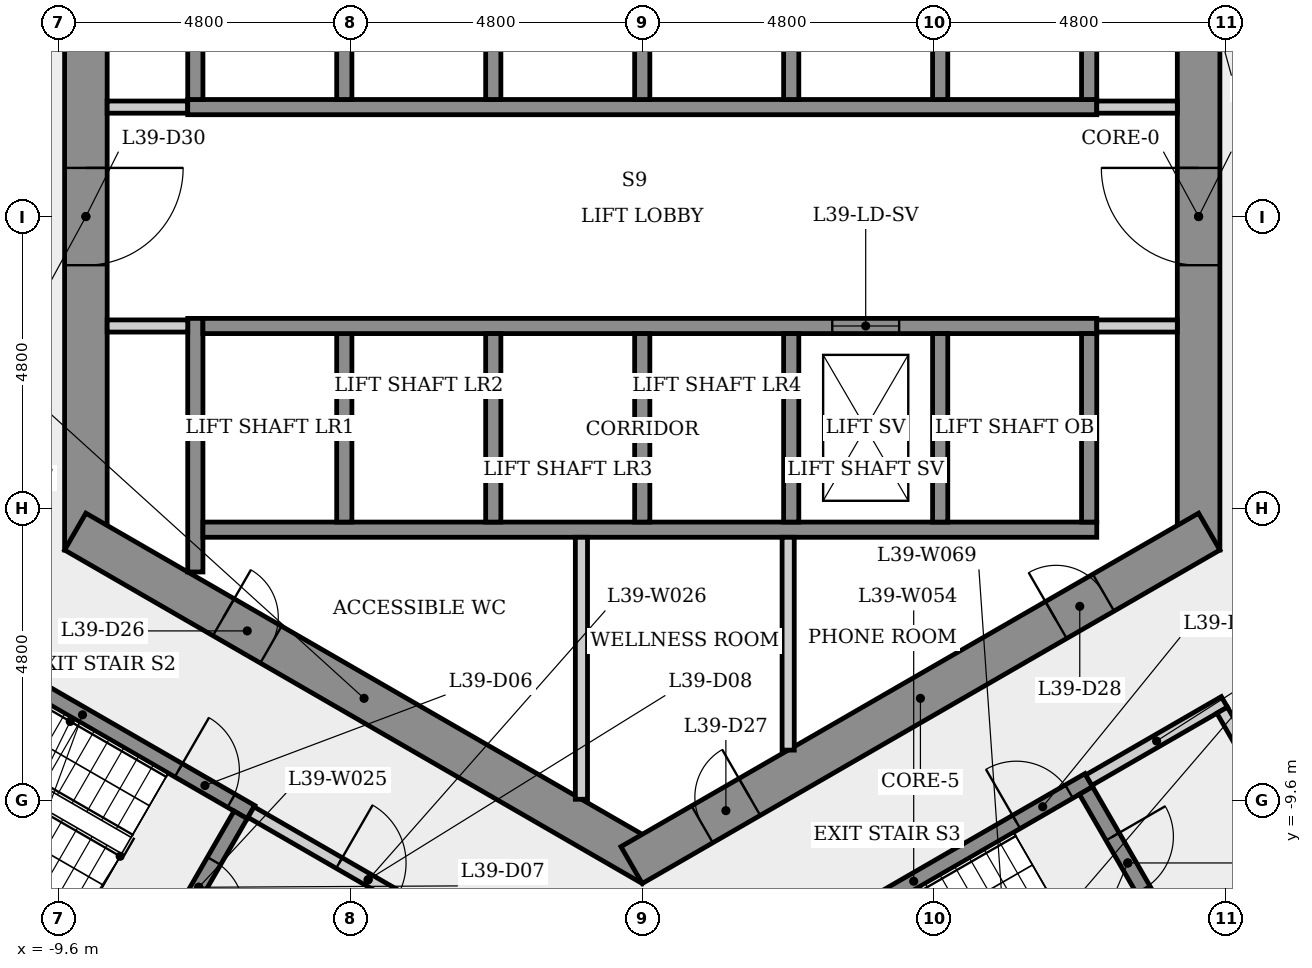
"""IFC4 building model, lengths in metres.
Left out: names, types, materials, properties, quantities, classifications, styles, units other than length and angle.
Written with IfcOpenShell. Run it as: python <this file> out.ifc"""

import sys

from ifc_helpers import new_model, si_unit, direction, frame, frame_2d, origin, place, context, subcontext, project, spatial, rectangle, extrude, element, fill, save


model = new_model("IFC4")
c1 = context("Model", 3, precision=1e-05, world=origin(), true_north=direction((0.0, 1.0)))
c2 = subcontext(c1, "Body", "Model", "MODEL_VIEW")
j1 = project(units=[si_unit("LENGTHUNIT", "METRE"), si_unit("PLANEANGLEUNIT", "RADIAN")], contexts=[c1])
p1 = place(None, origin())
s1 = spatial("IfcSite", under=j1, at=p1, CompositionType="ELEMENT")
p2 = place(p1, origin())
s2 = spatial("IfcBuilding", under=s1, at=p2, CompositionType="ELEMENT")
p3 = place(p2, frame((0.0, 0.0, 147.9)))
s3 = spatial("IfcBuildingStorey", under=s2, at=p3, CompositionType="ELEMENT", Elevation=147.9)
p4 = place(p3, frame((9.15, -5.485, 0.0), z_axis=(0.0, 0.0, 1.0), x_axis=(0.0, 1.0, 0.0)))
e1 = element("IfcWall", 1, at=p4, inside=s3, PredefinedType="SHEAR", context=c2, shape_type="SweptSolid", body=[
    extrude(rectangle(XDim=10.97, YDim=0.7, at=frame_2d((5.485, 0.0))), origin(), (0.0, 0.0, 1.0), 4.8),
])
p5 = place(p4, frame((4.685, 0.0, 0.0)))
e2 = element("IfcOpeningElement", 2, at=p5, cuts=e1, PredefinedType="OPENING", context=c2, shape_type="SweptSolid", body=[
    extrude(rectangle(XDim=1.6, YDim=2.1, at=frame_2d((0.8, 1.05))), frame((0.0, 0.36, 0.0), z_axis=(0.0, -1.0, 0.0), x_axis=(1.0, 0.0, 0.0)), (0.0, 0.0, 1.0), 0.72),
])
p6 = place(p3, frame((-9.15, 5.485, 0.0), z_axis=(0.0, 0.0, 1.0), x_axis=(0.0, -1.0, 0.0)))
e3 = element("IfcWall", 3, at=p6, inside=s3, PredefinedType="SHEAR", context=c2, shape_type="SweptSolid", body=[
    extrude(rectangle(XDim=10.97, YDim=0.7, at=frame_2d((5.485, 0.0))), origin(), (0.0, 0.0, 1.0), 4.8),
])
p7 = place(p6, frame((4.685, 0.0, 0.0)))
e4 = element("IfcOpeningElement", 4, at=p7, cuts=e3, PredefinedType="OPENING", context=c2, shape_type="SweptSolid", body=[
    extrude(rectangle(XDim=1.6, YDim=2.1, at=frame_2d((0.8, 1.05))), frame((0.0, 0.36, 0.0), z_axis=(0.0, -1.0, 0.0), x_axis=(1.0, 0.0, 0.0)), (0.0, 0.0, 1.0), 0.72),
])
p8 = place(p3, frame((-9.325, -5.182, 0.0), z_axis=(0.0, 0.0, 1.0), x_axis=(0.866023993627, -0.500002442456, 0.0)))
e5 = element("IfcWall", 5, at=p8, inside=s3, PredefinedType="SHEAR", context=c2, shape_type="SweptSolid", body=[
    extrude(rectangle(XDim=10.97, YDim=0.7, at=frame_2d((5.485, 0.0))), origin(), (0.0, 0.0, 1.0), 4.8),
])
p9 = place(p8, frame((2.817, 0.0, 0.0)))
e6 = element("IfcOpeningElement", 6, at=p9, cuts=e5, PredefinedType="OPENING", context=c2, shape_type="SweptSolid", body=[
    extrude(rectangle(XDim=0.9, YDim=2.1, at=frame_2d((0.45, 1.05))), frame((0.0, 0.36, 0.0), z_axis=(0.0, -1.0, 0.0), x_axis=(1.0, 0.0, 0.0)), (0.0, 0.0, 1.0), 0.72),
])
p10 = place(p3, frame((-0.175, -10.667, 0.0), z_axis=(0.0, 0.0, 1.0), x_axis=(0.866023993627, 0.500002442456, 0.0)))
e7 = element("IfcWall", 7, at=p10, inside=s3, PredefinedType="SHEAR", context=c2, shape_type="SweptSolid", body=[
    extrude(rectangle(XDim=10.97, YDim=0.7, at=frame_2d((5.485, 0.0))), origin(), (0.0, 0.0, 1.0), 4.8),
])
p11 = place(p10, frame((1.34, 0.0, 0.0)))
e8 = element("IfcOpeningElement", 8, at=p11, cuts=e7, PredefinedType="OPENING", context=c2, shape_type="SweptSolid", body=[
    extrude(rectangle(XDim=0.9, YDim=2.1, at=frame_2d((0.45, 1.05))), frame((0.0, 0.36, 0.0), z_axis=(0.0, -1.0, 0.0), x_axis=(1.0, 0.0, 0.0)), (0.0, 0.0, 1.0), 0.72),
])
p12 = place(p10, frame((8.061, 0.0, 0.0)))
e9 = element("IfcOpeningElement", 9, at=p12, cuts=e7, PredefinedType="OPENING", context=c2, shape_type="SweptSolid", body=[
    extrude(rectangle(XDim=0.9, YDim=2.1, at=frame_2d((0.45, 1.05))), frame((0.0, 0.36, 0.0), z_axis=(0.0, -1.0, 0.0), x_axis=(1.0, 0.0, 0.0)), (0.0, 0.0, 1.0), 0.72),
])
p13 = place(p3, frame((-11.977, -6.595, 0.0), z_axis=(0.0, 0.0, 1.0), x_axis=(0.866025499775, -0.499999833739, 0.0)))
e10 = element("IfcWall", 10, at=p13, inside=s3, PredefinedType="SHEAR", context=c2, shape_type="SweptSolid", body=[
    extrude(rectangle(XDim=6.4, YDim=0.25, at=frame_2d((3.2, 0.0))), origin(), (0.0, 0.0, 1.0), 4.45),
])
p14 = place(p13, frame((5.025, 0.0, 0.0)))
e11 = element("IfcOpeningElement", 11, at=p14, cuts=e10, PredefinedType="OPENING", context=c2, shape_type="SweptSolid", body=[
    extrude(rectangle(XDim=1.0, YDim=2.1, at=frame_2d((0.5, 1.05))), frame((0.0, 0.135, 0.0), z_axis=(0.0, -1.0, 0.0), x_axis=(1.0, 0.0, 0.0)), (0.0, 0.0, 1.0), 0.27),
])
p15 = place(p3, frame((-8.8, 1.8, 0.0), z_axis=(0.0, 0.0, 1.0), x_axis=(1.0, 0.0, 0.0)))
e12 = element("IfcWall", 12, at=p15, inside=s3, PredefinedType="PARTITIONING", context=c2, shape_type="SweptSolid", body=[
    extrude(rectangle(XDim=1.325, YDim=0.2, at=frame_2d((0.663, 0.0))), origin(), (0.0, 0.0, 1.0), 4.45),
])
p16 = place(p3, frame((-7.935, -12.393, 0.0), z_axis=(0.0, 0.0, 1.0), x_axis=(-0.866025499775, 0.499999833739, 0.0)))
e13 = element("IfcWall", 13, at=p16, inside=s3, PredefinedType="SHEAR", context=c2, shape_type="SweptSolid", body=[
    extrude(rectangle(XDim=6.4, YDim=0.25, at=frame_2d((3.2, 0.0))), origin(), (0.0, 0.0, 1.0), 4.45),
])
p17 = place(p3, frame((-7.475, 1.8, 0.0), z_axis=(0.0, 0.0, 1.0), x_axis=(1.0, 0.0, 0.0)))
e14 = element("IfcWall", 14, at=p17, inside=s3, PredefinedType="SHEAR", context=c2, shape_type="SweptSolid", body=[
    extrude(rectangle(XDim=14.95, YDim=0.25, at=frame_2d((7.475, 0.0))), origin(), (0.0, 0.0, 1.0), 4.45),
])
p18 = place(p3, frame((-7.35, -5.846, 0.0), z_axis=(0.0, 0.0, 1.0), x_axis=(0.0, 1.0, 0.0)))
e15 = element("IfcWall", 15, at=p18, inside=s3, PredefinedType="SHEAR", context=c2, shape_type="SweptSolid", body=[
    extrude(rectangle(XDim=4.171, YDim=0.25, at=frame_2d((2.085, 0.0))), origin(), (0.0, 0.0, 1.0), 4.45),
])
p19 = place(p3, frame((-7.35, 1.925, 0.0), z_axis=(0.0, 0.0, 1.0), x_axis=(0.0, 1.0, 0.0)))
e16 = element("IfcWall", 16, at=p19, inside=s3, PredefinedType="SHEAR", context=c2, shape_type="SweptSolid", body=[
    extrude(rectangle(XDim=3.921, YDim=0.25, at=frame_2d((1.96, 0.0))), origin(), (0.0, 0.0, 1.0), 4.45),
])
p20 = place(p3, frame((-7.475, -1.8, 0.0), z_axis=(0.0, 0.0, 1.0), x_axis=(-1.0, 0.0, 0.0)))
e17 = element("IfcWall", 17, at=p20, inside=s3, PredefinedType="PARTITIONING", context=c2, shape_type="SweptSolid", body=[
    extrude(rectangle(XDim=1.325, YDim=0.2, at=frame_2d((0.663, 0.0))), origin(), (0.0, 0.0, 1.0), 4.45),
])
p21 = place(p3, frame((-6.605, -9.841, 0.0), z_axis=(0.0, 0.0, 1.0), x_axis=(-0.499996545922, -0.866027397988, 0.0)))
e18 = element("IfcWall", 18, at=p21, inside=s3, PredefinedType="SHEAR", context=c2, shape_type="SweptSolid", body=[
    extrude(rectangle(XDim=2.75, YDim=0.25, at=frame_2d((1.375, 0.0))), origin(), (0.0, 0.0, 1.0), 4.45),
])
p22 = place(p21, frame((0.875, 0.0, 0.0)))
e19 = element("IfcOpeningElement", 19, at=p22, cuts=e18, PredefinedType="OPENING", context=c2, shape_type="SweptSolid", body=[
    extrude(rectangle(XDim=1.0, YDim=2.1, at=frame_2d((0.5, 1.05))), frame((0.0, 0.135, 0.0), z_axis=(0.0, -1.0, 0.0), x_axis=(1.0, 0.0, 0.0)), (0.0, 0.0, 1.0), 0.27),
])
p23 = place(p3, frame((-6.435, -9.795, 0.0), z_axis=(0.0, 0.0, 1.0), x_axis=(0.866012907634, -0.500021643343, 0.0)))
e20 = element("IfcWall", 20, at=p23, inside=s3, PredefinedType="PARTITIONING", context=c2, shape_type="SweptSolid", body=[
    extrude(rectangle(XDim=4.45, YDim=0.2, at=frame_2d((2.225, 0.0))), origin(), (0.0, 0.0, 1.0), 4.45),
])
p24 = place(p23, frame((1.675, 0.0, 0.0)))
e21 = element("IfcOpeningElement", 21, at=p24, cuts=e20, PredefinedType="OPENING", context=c2, shape_type="SweptSolid", body=[
    extrude(rectangle(XDim=1.1, YDim=2.1, at=frame_2d((0.55, 1.05))), frame((0.0, 0.11, 0.0), z_axis=(0.0, -1.0, 0.0), x_axis=(1.0, 0.0, 0.0)), (0.0, 0.0, 1.0), 0.22),
])
p25 = place(p3, frame((-7.225, -5.15, 0.0), z_axis=(0.0, 0.0, 1.0), x_axis=(1.0, 0.0, 0.0)))
e22 = element("IfcWall", 22, at=p25, inside=s3, PredefinedType="SHEAR", context=c2, shape_type="SweptSolid", body=[
    extrude(rectangle(XDim=14.7, YDim=0.25, at=frame_2d((7.35, 0.0))), origin(), (0.0, 0.0, 1.0), 4.45),
])
p26 = place(p3, frame((-4.9, -1.925, 0.0), z_axis=(0.0, 0.0, 1.0), x_axis=(0.0, -1.0, 0.0)))
e23 = element("IfcWall", 23, at=p26, inside=s3, PredefinedType="SHEAR", context=c2, shape_type="SweptSolid", body=[
    extrude(rectangle(XDim=3.1, YDim=0.25, at=frame_2d((1.55, 0.0))), origin(), (0.0, 0.0, 1.0), 4.45),
])
p27 = place(p3, frame((-4.9, 5.025, 0.0), z_axis=(0.0, 0.0, 1.0), x_axis=(0.0, -1.0, 0.0)))
e24 = element("IfcWall", 24, at=p27, inside=s3, PredefinedType="SHEAR", context=c2, shape_type="SweptSolid", body=[
    extrude(rectangle(XDim=3.1, YDim=0.25, at=frame_2d((1.55, 0.0))), origin(), (0.0, 0.0, 1.0), 4.8),
])
p28 = place(p3, frame((-7.225, -1.8, 0.0), z_axis=(0.0, 0.0, 1.0), x_axis=(1.0, 0.0, 0.0)))
e25 = element("IfcWall", 25, at=p28, inside=s3, PredefinedType="SHEAR", context=c2, shape_type="SweptSolid", body=[
    extrude(rectangle(XDim=14.7, YDim=0.25, at=frame_2d((7.35, 0.0))), origin(), (0.0, 0.0, 1.0), 4.45),
])
p29 = place(p28, frame((10.35, 0.0, 0.0)))
e26 = element("IfcOpeningElement", 26, at=p29, cuts=e25, PredefinedType="OPENING", context=c2, shape_type="SweptSolid", body=[
    extrude(rectangle(XDim=1.1, YDim=2.1, at=frame_2d((0.55, 1.05))), frame((0.0, 0.135, 0.0), z_axis=(0.0, -1.0, 0.0), x_axis=(1.0, 0.0, 0.0)), (0.0, 0.0, 1.0), 0.27),
])
p30 = place(p3, frame((-2.45, -1.925, 0.0), z_axis=(0.0, 0.0, 1.0), x_axis=(0.0, -1.0, 0.0)))
e27 = element("IfcWall", 27, at=p30, inside=s3, PredefinedType="SHEAR", context=c2, shape_type="SweptSolid", body=[
    extrude(rectangle(XDim=3.1, YDim=0.25, at=frame_2d((1.55, 0.0))), origin(), (0.0, 0.0, 1.0), 4.45),
])
p31 = place(p3, frame((-2.45, 5.025, 0.0), z_axis=(0.0, 0.0, 1.0), x_axis=(0.0, -1.0, 0.0)))
e28 = element("IfcWall", 28, at=p31, inside=s3, PredefinedType="SHEAR", context=c2, shape_type="SweptSolid", body=[
    extrude(rectangle(XDim=3.1, YDim=0.25, at=frame_2d((1.55, 0.0))), origin(), (0.0, 0.0, 1.0), 4.8),
])
p32 = place(p3, frame((-1.0, -5.275, 0.0), z_axis=(0.0, 0.0, 1.0), x_axis=(0.0, -1.0, 0.0)))
e29 = element("IfcWall", 29, at=p32, inside=s3, PredefinedType="PARTITIONING", context=c2, shape_type="SweptSolid", body=[
    extrude(rectangle(XDim=4.309, YDim=0.2, at=frame_2d((2.155, 0.0))), origin(), (0.0, 0.0, 1.0), 4.45),
])
p33 = place(p3, frame((0.0, -1.925, 0.0), z_axis=(0.0, 0.0, 1.0), x_axis=(0.0, -1.0, 0.0)))
e30 = element("IfcWall", 30, at=p33, inside=s3, PredefinedType="SHEAR", context=c2, shape_type="SweptSolid", body=[
    extrude(rectangle(XDim=3.1, YDim=0.25, at=frame_2d((1.55, 0.0))), origin(), (0.0, 0.0, 1.0), 4.45),
])
p34 = place(p3, frame((0.0, 5.025, 0.0), z_axis=(0.0, 0.0, 1.0), x_axis=(0.0, -1.0, 0.0)))
e31 = element("IfcWall", 31, at=p34, inside=s3, PredefinedType="SHEAR", context=c2, shape_type="SweptSolid", body=[
    extrude(rectangle(XDim=3.1, YDim=0.25, at=frame_2d((1.55, 0.0))), origin(), (0.0, 0.0, 1.0), 4.8),
])
p35 = place(p3, frame((1.585, -12.595, 0.0), z_axis=(0.0, 0.0, 1.0), x_axis=(0.866036417653, 0.499980922934, 0.0)))
e32 = element("IfcWall", 32, at=p35, inside=s3, PredefinedType="SHEAR", context=c2, shape_type="SweptSolid", body=[
    extrude(rectangle(XDim=6.65, YDim=0.25, at=frame_2d((3.325, 0.0))), origin(), (0.0, 0.0, 1.0), 4.45),
])
p36 = place(p35, frame((5.275, 0.0, 0.0)))
e33 = element("IfcOpeningElement", 33, at=p36, cuts=e32, PredefinedType="OPENING", context=c2, shape_type="SweptSolid", body=[
    extrude(rectangle(XDim=1.0, YDim=2.1, at=frame_2d((0.5, 1.05))), frame((0.0, 0.135, 0.0), z_axis=(0.0, -1.0, 0.0), x_axis=(1.0, 0.0, 0.0)), (0.0, 0.0, 1.0), 0.27),
])
p37 = place(p3, frame((2.4, -5.275, 0.0), z_axis=(0.0, 0.0, 1.0), x_axis=(0.0, -1.0, 0.0)))
e34 = element("IfcWall", 34, at=p37, inside=s3, PredefinedType="PARTITIONING", context=c2, shape_type="SweptSolid", body=[
    extrude(rectangle(XDim=3.501, YDim=0.2, at=frame_2d((1.75, 0.0))), origin(), (0.0, 0.0, 1.0), 4.45),
])
for number, where, z_axis, x_axis in (
    (35, (2.45, -1.925, 0.0), (0.0, 0.0, 1.0), (0.0, -1.0, 0.0)),
    (36, (2.45, 5.025, 0.0), (0.0, 0.0, 1.0), (0.0, -1.0, 0.0)),
    (37, (4.9, -1.925, 0.0), (0.0, 0.0, 1.0), (0.0, -1.0, 0.0)),
    (38, (4.9, 5.025, 0.0), (0.0, 0.0, 1.0), (0.0, -1.0, 0.0)),
):
    element("IfcWall", number, at=place(p3, frame(where, z_axis=z_axis, x_axis=x_axis)), inside=s3, PredefinedType="SHEAR", context=c2, shape_type="SweptSolid", body=[
        extrude(rectangle(XDim=3.1, YDim=0.25, at=frame_2d((1.55, 0.0))), origin(), (0.0, 0.0, 1.0), 4.8),
    ])
p38 = place(p3, frame((7.298, -9.441, 0.0), z_axis=(0.0, 0.0, 1.0), x_axis=(0.500034990121, -0.866005201286, 0.0)))
e39 = element("IfcWall", 39, at=p38, inside=s3, PredefinedType="SHEAR", context=c2, shape_type="SweptSolid", body=[
    extrude(rectangle(XDim=2.75, YDim=0.25, at=frame_2d((1.375, 0.0))), origin(), (0.0, 0.0, 1.0), 4.45),
])
p39 = place(p38, frame((0.875, 0.0, 0.0)))
e40 = element("IfcOpeningElement", 40, at=p39, cuts=e39, PredefinedType="OPENING", context=c2, shape_type="SweptSolid", body=[
    extrude(rectangle(XDim=1.0, YDim=2.1, at=frame_2d((0.5, 1.05))), frame((0.0, 0.135, 0.0), z_axis=(0.0, -1.0, 0.0), x_axis=(1.0, 0.0, 0.0)), (0.0, 0.0, 1.0), 0.27),
])
p40 = place(p3, frame((7.344, -9.27, 0.0), z_axis=(0.0, 0.0, 1.0), x_axis=(0.866005588531, 0.500034319456, 0.0)))
e41 = element("IfcWall", 41, at=p40, inside=s3, PredefinedType="PARTITIONING", context=c2, shape_type="SweptSolid", body=[
    extrude(rectangle(XDim=2.575, YDim=0.2, at=frame_2d((1.288, 0.0))), origin(), (0.0, 0.0, 1.0), 4.45),
])
p41 = place(p3, frame((7.475, 1.8, 0.0), z_axis=(0.0, 0.0, 1.0), x_axis=(1.0, 0.0, 0.0)))
e42 = element("IfcWall", 42, at=p41, inside=s3, PredefinedType="PARTITIONING", context=c2, shape_type="SweptSolid", body=[
    extrude(rectangle(XDim=1.325, YDim=0.2, at=frame_2d((0.663, 0.0))), origin(), (0.0, 0.0, 1.0), 4.45),
])
for number, where, z_axis, x_axis in (
    (43, (7.35, -1.925, 0.0), (0.0, 0.0, 1.0), (0.0, -1.0, 0.0)),
    (44, (7.35, 5.025, 0.0), (0.0, 0.0, 1.0), (0.0, -1.0, 0.0)),
):
    element("IfcWall", number, at=place(p3, frame(where, z_axis=z_axis, x_axis=x_axis)), inside=s3, PredefinedType="SHEAR", context=c2, shape_type="SweptSolid", body=[
        extrude(rectangle(XDim=3.1, YDim=0.25, at=frame_2d((1.55, 0.0))), origin(), (0.0, 0.0, 1.0), 4.8),
    ])
p42 = place(p3, frame((8.8, -1.8, 0.0), z_axis=(0.0, 0.0, 1.0), x_axis=(-1.0, 0.0, 0.0)))
e45 = element("IfcWall", 45, at=p42, inside=s3, PredefinedType="PARTITIONING", context=c2, shape_type="SweptSolid", body=[
    extrude(rectangle(XDim=1.325, YDim=0.2, at=frame_2d((0.663, 0.0))), origin(), (0.0, 0.0, 1.0), 4.45),
])
p43 = place(p3, frame((9.537, -8.119, 0.0), z_axis=(0.0, 0.0, 1.0), x_axis=(0.499990139034, -0.866031096941, 0.0)))
e46 = element("IfcWall", 46, at=p43, inside=s3, PredefinedType="PARTITIONING", context=c2, shape_type="SweptSolid", body=[
    extrude(rectangle(XDim=3.0, YDim=0.2, at=frame_2d((1.5, 0.0))), origin(), (0.0, 0.0, 1.0), 4.45),
])
p44 = place(p43, frame((0.935, 0.0, 0.0)))
e47 = element("IfcOpeningElement", 47, at=p44, cuts=e46, PredefinedType="OPENING", context=c2, shape_type="SweptSolid", body=[
    extrude(rectangle(XDim=1.0, YDim=2.1, at=frame_2d((0.5, 1.05))), frame((0.0, 0.11, 0.0), z_axis=(0.0, -1.0, 0.0), x_axis=(1.0, 0.0, 0.0)), (0.0, 0.0, 1.0), 0.22),
])
p45 = place(p3, frame((10.901, -10.681, 0.0), z_axis=(0.0, 0.0, 1.0), x_axis=(-0.866007538022, -0.500030943131, 0.0)))
e48 = element("IfcWall", 48, at=p45, inside=s3, PredefinedType="PLUMBINGWALL", context=c2, shape_type="SweptSolid", body=[
    extrude(rectangle(XDim=2.375, YDim=0.2, at=frame_2d((1.188, 0.0))), origin(), (0.0, 0.0, 1.0), 4.45),
])
p46 = place(p29, origin())
e49 = element("IfcDoor", 49, at=p46, inside=s3, OperationType="SLIDING_TO_LEFT", PredefinedType="DOOR", context=c2, shape_type="SweptSolid", body=[
    extrude(rectangle(XDim=1.1, YDim=2.1, at=frame_2d((0.55, 1.05))), frame((0.0, 0.025, 0.0), z_axis=(0.0, -1.0, 0.0), x_axis=(1.0, 0.0, 0.0)), (0.0, 0.0, 1.0), 0.05),
])
fill(e26, e49)
p47 = place(p14, origin())
e50 = element("IfcDoor", 50, at=p47, inside=s3, OperationType="SINGLE_SWING_LEFT", PredefinedType="DOOR", context=c2, shape_type="SweptSolid", body=[
    extrude(rectangle(XDim=1.0, YDim=2.1, at=frame_2d((0.5, 1.05))), frame((0.0, 0.025, 0.0), z_axis=(0.0, -1.0, 0.0), x_axis=(1.0, 0.0, 0.0)), (0.0, 0.0, 1.0), 0.05),
])
fill(e11, e50)
p48 = place(p22, origin())
e51 = element("IfcDoor", 51, at=p48, inside=s3, OperationType="SINGLE_SWING_RIGHT", PredefinedType="DOOR", context=c2, shape_type="SweptSolid", body=[
    extrude(rectangle(XDim=1.0, YDim=2.1, at=frame_2d((0.5, 1.05))), frame((0.0, 0.025, 0.0), z_axis=(0.0, -1.0, 0.0), x_axis=(1.0, 0.0, 0.0)), (0.0, 0.0, 1.0), 0.05),
])
fill(e19, e51)
p49 = place(p24, origin())
e52 = element("IfcDoor", 52, at=p49, inside=s3, OperationType="SINGLE_SWING_LEFT", PredefinedType="DOOR", context=c2, shape_type="SweptSolid", body=[
    extrude(rectangle(XDim=1.1, YDim=2.1, at=frame_2d((0.55, 1.05))), frame((0.0, 0.025, 0.0), z_axis=(0.0, -1.0, 0.0), x_axis=(1.0, 0.0, 0.0)), (0.0, 0.0, 1.0), 0.05),
])
fill(e21, e52)
p50 = place(p36, origin())
e53 = element("IfcDoor", 53, at=p50, inside=s3, OperationType="SINGLE_SWING_LEFT", PredefinedType="DOOR", context=c2, shape_type="SweptSolid", body=[
    extrude(rectangle(XDim=1.0, YDim=2.1, at=frame_2d((0.5, 1.05))), frame((0.0, 0.025, 0.0), z_axis=(0.0, -1.0, 0.0), x_axis=(1.0, 0.0, 0.0)), (0.0, 0.0, 1.0), 0.05),
])
fill(e33, e53)
p51 = place(p39, origin())
e54 = element("IfcDoor", 54, at=p51, inside=s3, OperationType="SINGLE_SWING_LEFT", PredefinedType="DOOR", context=c2, shape_type="SweptSolid", body=[
    extrude(rectangle(XDim=1.0, YDim=2.1, at=frame_2d((0.5, 1.05))), frame((0.0, 0.025, 0.0), z_axis=(0.0, -1.0, 0.0), x_axis=(1.0, 0.0, 0.0)), (0.0, 0.0, 1.0), 0.05),
])
fill(e40, e54)
p52 = place(p9, origin())
e55 = element("IfcDoor", 55, at=p52, inside=s3, OperationType="SINGLE_SWING_LEFT", PredefinedType="DOOR", context=c2, shape_type="SweptSolid", body=[
    extrude(rectangle(XDim=0.9, YDim=2.1, at=frame_2d((0.45, 1.05))), frame((0.0, 0.025, 0.0), z_axis=(0.0, -1.0, 0.0), x_axis=(1.0, 0.0, 0.0)), (0.0, 0.0, 1.0), 0.05),
])
fill(e6, e55)
p53 = place(p11, origin())
e56 = element("IfcDoor", 56, at=p53, inside=s3, OperationType="SINGLE_SWING_RIGHT", PredefinedType="DOOR", context=c2, shape_type="SweptSolid", body=[
    extrude(rectangle(XDim=0.9, YDim=2.1, at=frame_2d((0.45, 1.05))), frame((0.0, 0.025, 0.0), z_axis=(0.0, -1.0, 0.0), x_axis=(1.0, 0.0, 0.0)), (0.0, 0.0, 1.0), 0.05),
])
fill(e8, e56)
p54 = place(p12, origin())
e57 = element("IfcDoor", 57, at=p54, inside=s3, OperationType="SINGLE_SWING_LEFT", PredefinedType="DOOR", context=c2, shape_type="SweptSolid", body=[
    extrude(rectangle(XDim=0.9, YDim=2.1, at=frame_2d((0.45, 1.05))), frame((0.0, 0.025, 0.0), z_axis=(0.0, -1.0, 0.0), x_axis=(1.0, 0.0, 0.0)), (0.0, 0.0, 1.0), 0.05),
])
fill(e9, e57)
p55 = place(p5, origin())
e58 = element("IfcDoor", 58, at=p55, inside=s3, OperationType="SINGLE_SWING_RIGHT", PredefinedType="DOOR", context=c2, shape_type="SweptSolid", body=[
    extrude(rectangle(XDim=1.6, YDim=2.1, at=frame_2d((0.8, 1.05))), frame((0.0, 0.025, 0.0), z_axis=(0.0, -1.0, 0.0), x_axis=(1.0, 0.0, 0.0)), (0.0, 0.0, 1.0), 0.05),
])
fill(e2, e58)
p56 = place(p7, origin())
e59 = element("IfcDoor", 59, at=p56, inside=s3, OperationType="SINGLE_SWING_LEFT", PredefinedType="DOOR", context=c2, shape_type="SweptSolid", body=[
    extrude(rectangle(XDim=1.6, YDim=2.1, at=frame_2d((0.8, 1.05))), frame((0.0, 0.025, 0.0), z_axis=(0.0, -1.0, 0.0), x_axis=(1.0, 0.0, 0.0)), (0.0, 0.0, 1.0), 0.05),
])
fill(e4, e59)
save(model, sys.argv[1])
